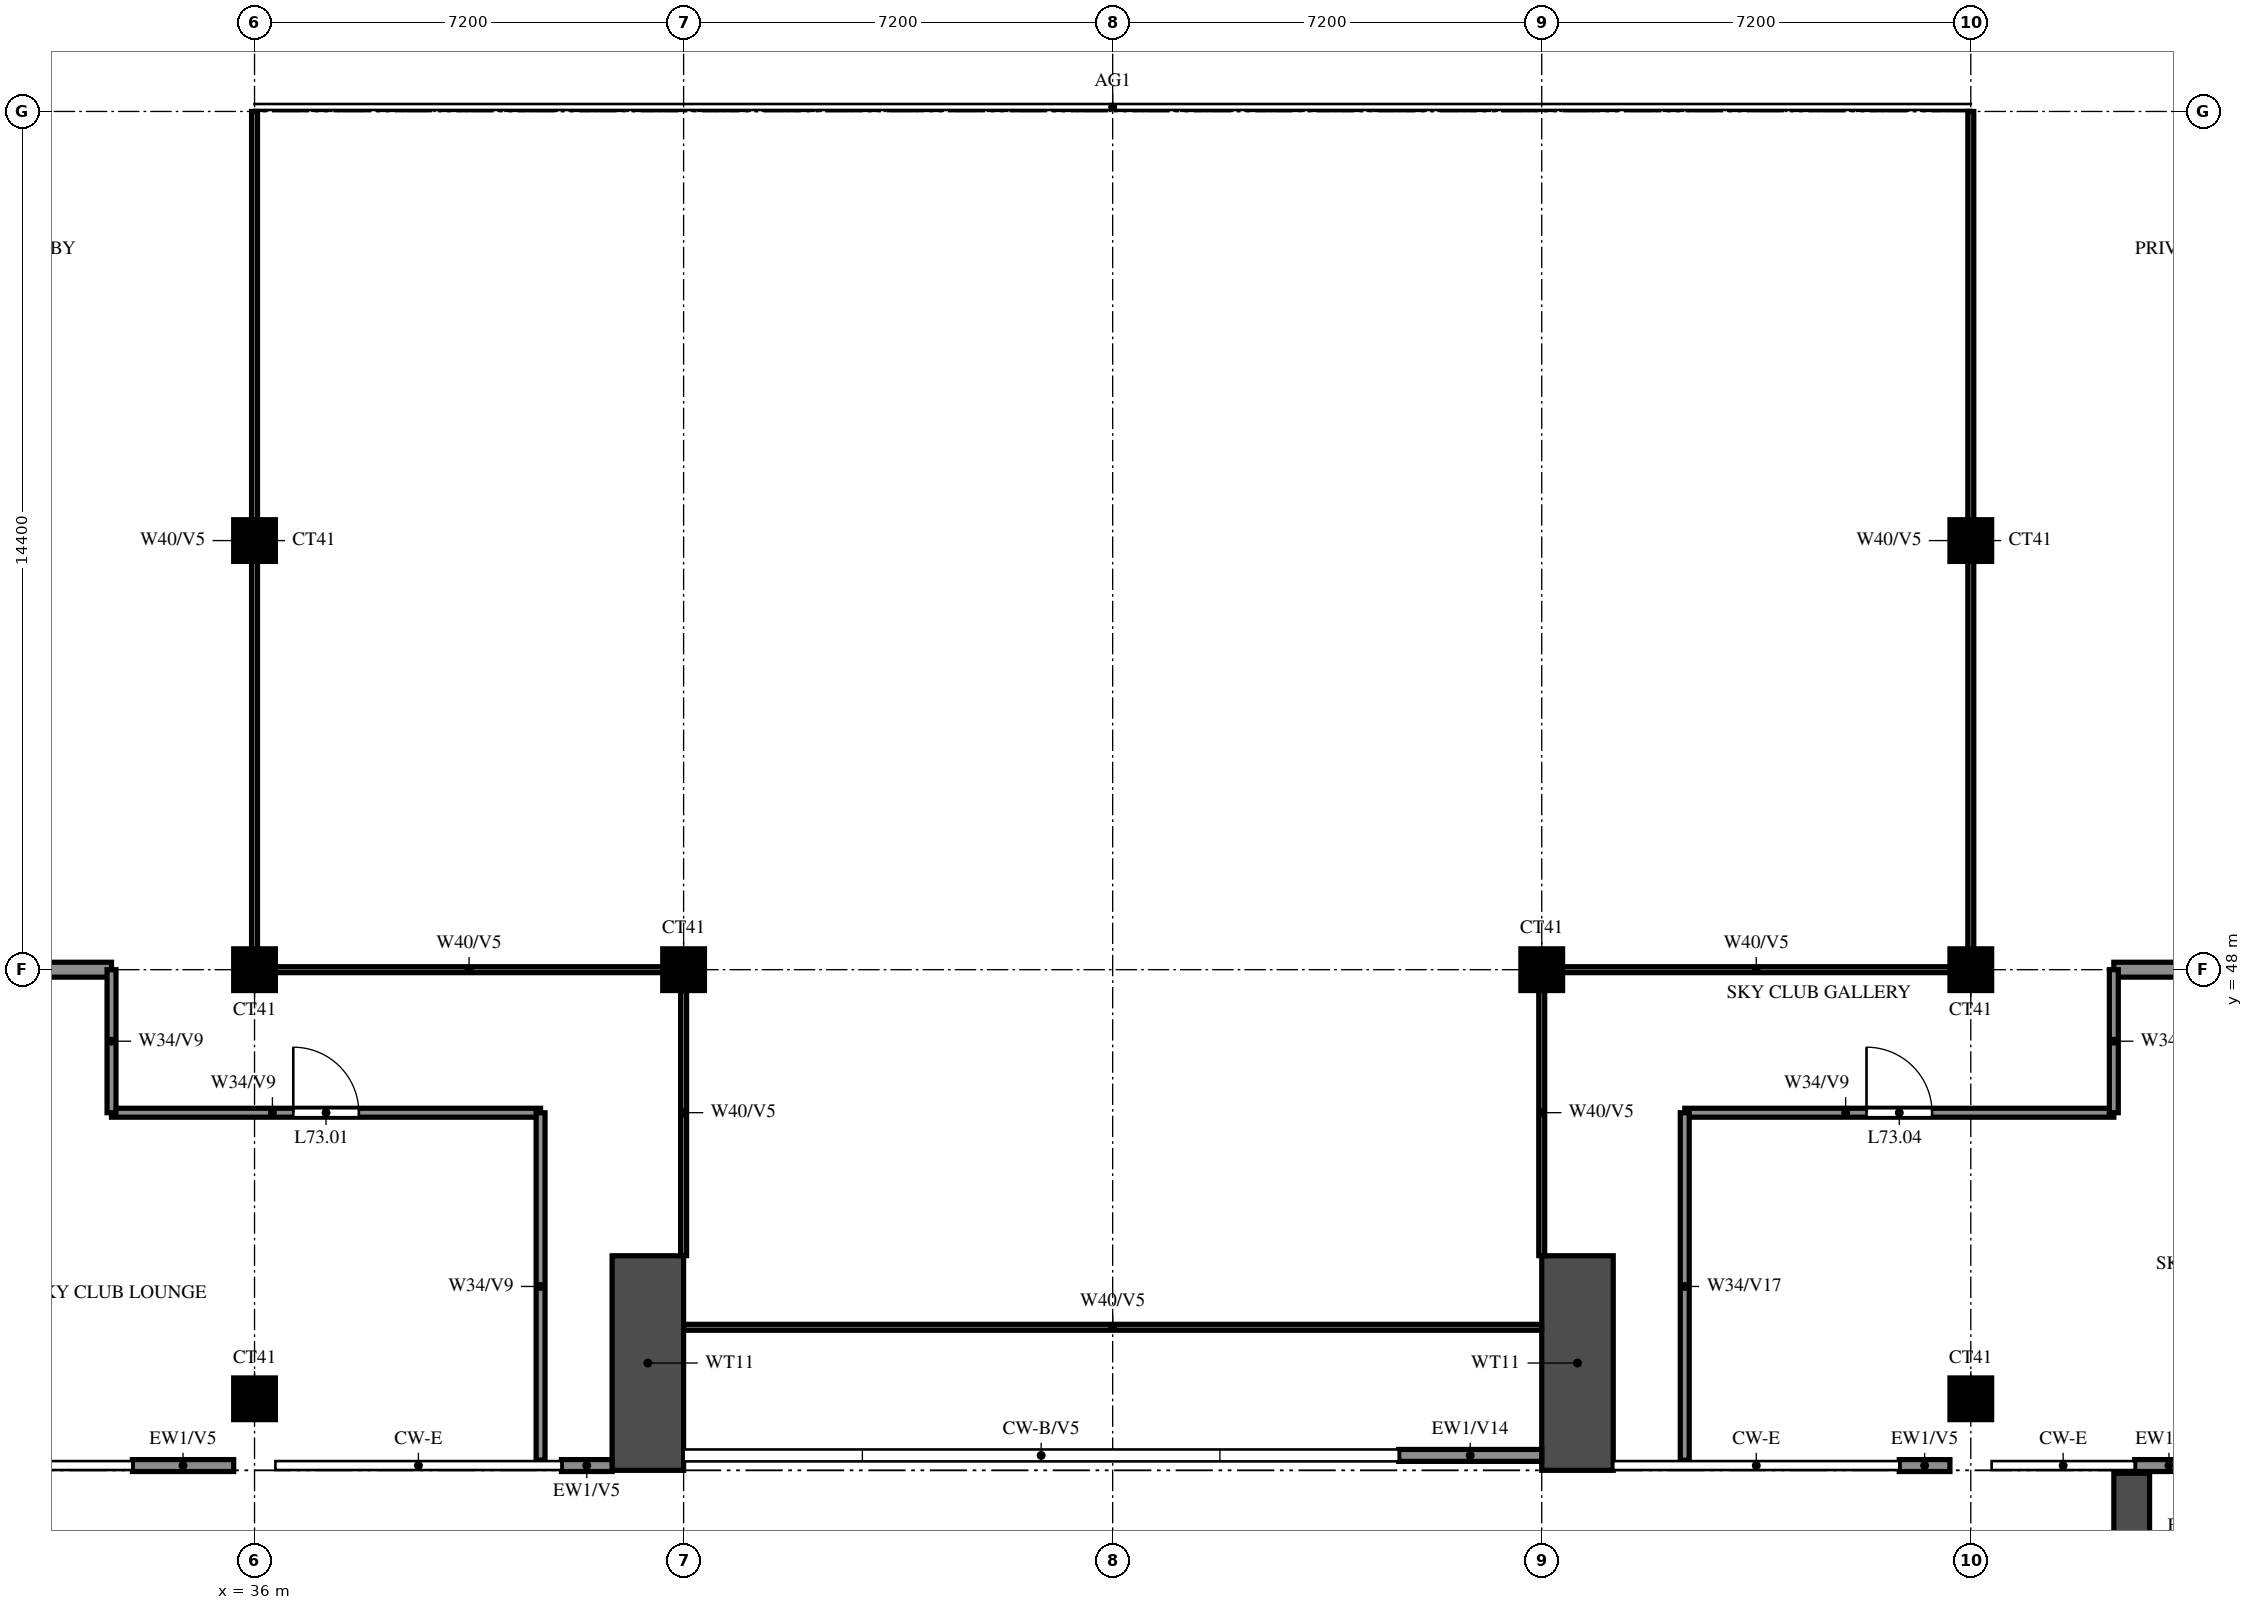
"""IFC4 building model, lengths in metres.
Left out: names, types, materials, properties, quantities, classifications, styles, units other than length and angle.
Written with IfcOpenShell. Run it as: python <this file> out.ifc"""

import sys

from ifc_helpers import new_model, si_unit, direction, frame, frame_2d, origin, origin_2d, place, context, subcontext, project, spatial, rectangle, extrude, source, transform, mapped, element, fill, save


model = new_model("IFC4")
c1 = context("Model", 3, precision=1e-05, world=origin(), true_north=direction((0.0, 1.0)))
c2 = subcontext(c1, "Body", "Model", "MODEL_VIEW")
j1 = project(units=[si_unit("LENGTHUNIT", "METRE"), si_unit("PLANEANGLEUNIT", "RADIAN")], contexts=[c1])
p1 = place(None, origin())
s1 = spatial("IfcSite", under=j1, at=p1, CompositionType="ELEMENT")
p2 = place(p1, origin())
s2 = spatial("IfcBuilding", under=s1, at=p2, CompositionType="ELEMENT")
p3 = place(p2, frame((0.0, 0.0, 271.0)))
s3 = spatial("IfcBuildingStorey", under=s2, at=p3, CompositionType="ELEMENT", Elevation=271.0)
m1 = source(origin(), c2, "Body", "SweptSolid", [
    extrude(rectangle(XDim=0.7, YDim=0.7, at=origin_2d()), origin(), (0.0, 0.0, 1.0), 3.15),
])
for number, where, z_axis, x_axis in (
    (1, (36.0, 40.8, 0.0), (0.0, 0.0, 1.0), (1.0, 0.0, 0.0)),
    (2, (64.8, 40.8, 0.0), (0.0, 0.0, 1.0), (1.0, 0.0, 0.0)),
    (3, (36.0, 48.0, 0.0), (0.0, 0.0, 1.0), (1.0, 0.0, 0.0)),
    (4, (43.2, 48.0, 0.0), (0.0, 0.0, 1.0), (1.0, 0.0, 0.0)),
    (5, (57.6, 48.0, 0.0), (0.0, 0.0, 1.0), (1.0, 0.0, 0.0)),
    (6, (64.8, 48.0, 0.0), (0.0, 0.0, 1.0), (1.0, 0.0, 0.0)),
    (7, (36.0, 55.2, 0.0), (0.0, 0.0, 1.0), (1.0, 0.0, 0.0)),
    (8, (64.8, 55.2, 0.0), (0.0, 0.0, 1.0), (1.0, 0.0, 0.0)),
):
    element("IfcColumn", number, at=place(p3, frame(where, z_axis=z_axis, x_axis=x_axis)), inside=s3, PredefinedType="COLUMN", context=c2, shape_type="MappedRepresentation", body=[
        mapped(m1, transform((0.0, 0.0, 0.0))),
    ])
for number, where, z_axis, x_axis in (
    (9, (42.6, 39.6, 0.0), (0.0, 0.0, 1.0), (0.0, 1.0, 0.0)),
    (10, (58.2, 39.6, 0.0), (0.0, 0.0, 1.0), (0.0, 1.0, 0.0)),
):
    element("IfcWall", number, at=place(p3, frame(where, z_axis=z_axis, x_axis=x_axis)), inside=s3, PredefinedType="SHEAR", context=c2, shape_type="SweptSolid", body=[
        extrude(rectangle(XDim=3.6, YDim=1.2, at=frame_2d((1.8, 0.0))), origin(), (0.0, 0.0, 1.0), 3.15),
    ])
p4 = place(p3, frame((33.95, 39.68, 0.0), z_axis=(0.0, 0.0, 1.0), x_axis=(1.0, 0.0, 0.0)))
e11 = element("IfcWall", 11, at=p4, inside=s3, PredefinedType="SOLIDWALL", context=c2, shape_type="SweptSolid", body=[
    extrude(rectangle(XDim=1.7, YDim=0.2, at=frame_2d((0.85, 0.0))), origin(), (0.0, 0.0, 1.0), 3.15),
])
p5 = place(p3, frame((41.15, 39.68, 0.0), z_axis=(0.0, 0.0, 1.0), x_axis=(1.0, 0.0, 0.0)))
e12 = element("IfcWall", 12, at=p5, inside=s3, PredefinedType="SOLIDWALL", context=c2, shape_type="SweptSolid", body=[
    extrude(rectangle(XDim=0.85, YDim=0.2, at=frame_2d((0.425, 0.0))), origin(), (0.0, 0.0, 1.0), 3.15),
])
p6 = place(p3, frame((63.6, 39.68, 0.0), z_axis=(0.0, 0.0, 1.0), x_axis=(1.0, 0.0, 0.0)))
e13 = element("IfcWall", 13, at=p6, inside=s3, PredefinedType="SOLIDWALL", context=c2, shape_type="SweptSolid", body=[
    extrude(rectangle(XDim=0.85, YDim=0.2, at=frame_2d((0.425, 0.0))), origin(), (0.0, 0.0, 1.0), 3.15),
])
p7 = place(p3, frame((67.55, 39.68, 0.0), z_axis=(0.0, 0.0, 1.0), x_axis=(1.0, 0.0, 0.0)))
e14 = element("IfcWall", 14, at=p7, inside=s3, PredefinedType="SOLIDWALL", context=c2, shape_type="SweptSolid", body=[
    extrude(rectangle(XDim=1.15, YDim=0.2, at=frame_2d((0.575, 0.0))), origin(), (0.0, 0.0, 1.0), 3.15),
])
p8 = place(p3, frame((55.2, 39.85, 0.0), z_axis=(0.0, 0.0, 1.0), x_axis=(1.0, 0.0, 0.0)))
e15 = element("IfcWall", 15, at=p8, inside=s3, PredefinedType="SOLIDWALL", context=c2, shape_type="SweptSolid", body=[
    extrude(rectangle(XDim=2.4, YDim=0.2, at=frame_2d((1.2, 0.0))), origin(), (0.0, 0.0, 1.0), 1.95),
])
p9 = place(p3, frame((67.5, 39.55, 0.0), z_axis=(0.0, 0.0, 1.0), x_axis=(0.0, -1.0, 0.0)))
e16 = element("IfcWall", 16, at=p9, inside=s3, PredefinedType="SOLIDWALL", context=c2, shape_type="SweptSolid", body=[
    extrude(rectangle(XDim=2.65, YDim=0.6, at=frame_2d((1.325, 0.0))), origin(), (0.0, 0.0, 1.0), 2.901),
])
p10 = place(p3, frame((43.202, 42.0, 0.0), z_axis=(0.0, 0.0, 1.0), x_axis=(1.0, 0.0, 0.0)))
e17 = element("IfcWall", 17, at=p10, inside=s3, PredefinedType="PARTITIONING", context=c2, shape_type="SweptSolid", body=[
    extrude(rectangle(XDim=14.396, YDim=0.1, at=frame_2d((7.198, 0.0))), origin(), (0.0, 0.0, 1.0), 2.25),
])
p11 = place(p3, frame((33.6, 45.6, 0.0), z_axis=(0.0, 0.0, 1.0), x_axis=(1.0, 0.0, 0.0)))
e18 = element("IfcWall", 18, at=p11, inside=s3, PredefinedType="PARTITIONING", context=c2, shape_type="SweptSolid", body=[
    extrude(rectangle(XDim=7.2, YDim=0.15, at=frame_2d((3.6, 0.0))), origin(), (0.0, 0.0, 1.0), 3.15),
])
p12 = place(p11, frame((3.05, 0.0, 0.0)))
e19 = element("IfcOpeningElement", 19, at=p12, cuts=e18, PredefinedType="OPENING", context=c2, shape_type="SweptSolid", body=[
    extrude(rectangle(XDim=1.1, YDim=2.1, at=frame_2d((0.55, 1.05))), frame((0.0, 0.085, 0.0), z_axis=(0.0, -1.0, 0.0), x_axis=(1.0, 0.0, 0.0)), (0.0, 0.0, 1.0), 0.17),
])
p13 = place(p3, frame((60.0, 45.6, 0.0), z_axis=(0.0, 0.0, 1.0), x_axis=(1.0, 0.0, 0.0)))
e20 = element("IfcWall", 20, at=p13, inside=s3, PredefinedType="PARTITIONING", context=c2, shape_type="SweptSolid", body=[
    extrude(rectangle(XDim=7.2, YDim=0.15, at=frame_2d((3.6, 0.0))), origin(), (0.0, 0.0, 1.0), 3.15),
])
p14 = place(p13, frame((3.05, 0.0, 0.0)))
e21 = element("IfcOpeningElement", 21, at=p14, cuts=e20, PredefinedType="OPENING", context=c2, shape_type="SweptSolid", body=[
    extrude(rectangle(XDim=1.1, YDim=2.1, at=frame_2d((0.55, 1.05))), frame((0.0, 0.085, 0.0), z_axis=(0.0, -1.0, 0.0), x_axis=(1.0, 0.0, 0.0)), (0.0, 0.0, 1.0), 0.17),
])
for number, where, z_axis, x_axis in (
    (22, (36.0, 48.0, 0.0), (0.0, 0.0, 1.0), (1.0, 0.0, 0.0)),
    (23, (57.6, 48.0, 0.0), (0.0, 0.0, 1.0), (1.0, 0.0, 0.0)),
):
    element("IfcWall", number, at=place(p3, frame(where, z_axis=z_axis, x_axis=x_axis)), inside=s3, PredefinedType="PARTITIONING", context=c2, shape_type="SweptSolid", body=[
        extrude(rectangle(XDim=7.2, YDim=0.1, at=frame_2d((3.6, 0.0))), origin(), (0.0, 0.0, 1.0), 2.25),
    ])
p15 = place(p3, frame((18.57, 48.0, 0.0), z_axis=(0.0, 0.0, 1.0), x_axis=(1.0, 0.0, 0.0)))
e24 = element("IfcWall", 24, at=p15, inside=s3, PredefinedType="SOLIDWALL", context=c2, shape_type="SweptSolid", body=[
    extrude(rectangle(XDim=15.03, YDim=0.25, at=frame_2d((7.515, 0.0))), origin(), (0.0, 0.0, 1.0), 3.15),
])
p16 = place(p3, frame((67.2, 48.0, 0.0), z_axis=(0.0, 0.0, 1.0), x_axis=(1.0, 0.0, 0.0)))
e25 = element("IfcWall", 25, at=p16, inside=s3, PredefinedType="SOLIDWALL", context=c2, shape_type="SweptSolid", body=[
    extrude(rectangle(XDim=4.63, YDim=0.25, at=frame_2d((2.315, 0.0))), origin(), (0.0, 0.0, 1.0), 3.15),
])
p17 = place(p3, frame((33.6, 45.6, 0.0), z_axis=(0.0, 0.0, 1.0), x_axis=(0.0, 1.0, 0.0)))
e26 = element("IfcWall", 26, at=p17, inside=s3, PredefinedType="PARTITIONING", context=c2, shape_type="SweptSolid", body=[
    extrude(rectangle(XDim=2.4, YDim=0.15, at=frame_2d((1.2, 0.0))), origin(), (0.0, 0.0, 1.0), 3.15),
])
p18 = place(p3, frame((36.0, 48.0, 0.0), z_axis=(0.0, 0.0, 1.0), x_axis=(0.0, 1.0, 0.0)))
e27 = element("IfcWall", 27, at=p18, inside=s3, PredefinedType="PARTITIONING", context=c2, shape_type="SweptSolid", body=[
    extrude(rectangle(XDim=14.4, YDim=0.1, at=frame_2d((7.2, 0.0))), origin(), (0.0, 0.0, 1.0), 2.25),
])
p19 = place(p3, frame((40.8, 39.77, 0.0), z_axis=(0.0, 0.0, 1.0), x_axis=(0.0, 1.0, 0.0)))
e28 = element("IfcWall", 28, at=p19, inside=s3, PredefinedType="PARTITIONING", context=c2, shape_type="SweptSolid", body=[
    extrude(rectangle(XDim=5.83, YDim=0.15, at=frame_2d((2.915, 0.0))), origin(), (0.0, 0.0, 1.0), 3.15),
])
for number, where, z_axis, x_axis in (
    (29, (43.2, 43.202, 0.0), (0.0, 0.0, 1.0), (0.0, 1.0, 0.0)),
    (30, (57.6, 43.202, 0.0), (0.0, 0.0, 1.0), (0.0, 1.0, 0.0)),
):
    element("IfcWall", number, at=place(p3, frame(where, z_axis=z_axis, x_axis=x_axis)), inside=s3, PredefinedType="PARTITIONING", context=c2, shape_type="SweptSolid", body=[
        extrude(rectangle(XDim=4.798, YDim=0.1, at=frame_2d((2.399, 0.0))), origin(), (0.0, 0.0, 1.0), 2.25),
    ])
p20 = place(p3, frame((60.0, 39.77, 0.0), z_axis=(0.0, 0.0, 1.0), x_axis=(0.0, 1.0, 0.0)))
e31 = element("IfcWall", 31, at=p20, inside=s3, PredefinedType="PARTITIONING", context=c2, shape_type="SweptSolid", body=[
    extrude(rectangle(XDim=5.83, YDim=0.15, at=frame_2d((2.915, 0.0))), origin(), (0.0, 0.0, 1.0), 2.2),
])
p21 = place(p3, frame((64.8, 48.0, 0.0), z_axis=(0.0, 0.0, 1.0), x_axis=(0.0, 1.0, 0.0)))
e32 = element("IfcWall", 32, at=p21, inside=s3, PredefinedType="PARTITIONING", context=c2, shape_type="SweptSolid", body=[
    extrude(rectangle(XDim=14.4, YDim=0.1, at=frame_2d((7.2, 0.0))), origin(), (0.0, 0.0, 1.0), 2.25),
])
p22 = place(p3, frame((67.2, 45.6, 0.0), z_axis=(0.0, 0.0, 1.0), x_axis=(0.0, 1.0, 0.0)))
e33 = element("IfcWall", 33, at=p22, inside=s3, PredefinedType="PARTITIONING", context=c2, shape_type="SweptSolid", body=[
    extrude(rectangle(XDim=2.4, YDim=0.15, at=frame_2d((1.2, 0.0))), origin(), (0.0, 0.0, 1.0), 3.15),
])
p23 = place(p12, origin())
e34 = element("IfcDoor", 34, at=p23, inside=s3, OperationType="SINGLE_SWING_RIGHT", PredefinedType="DOOR", context=c2, shape_type="SweptSolid", body=[
    extrude(rectangle(XDim=1.1, YDim=2.1, at=frame_2d((0.55, 1.05))), frame((0.0, 0.025, 0.0), z_axis=(0.0, -1.0, 0.0), x_axis=(1.0, 0.0, 0.0)), (0.0, 0.0, 1.0), 0.05),
])
fill(e19, e34)
p24 = place(p14, origin())
e35 = element("IfcDoor", 35, at=p24, inside=s3, OperationType="SINGLE_SWING_RIGHT", PredefinedType="DOOR", context=c2, shape_type="SweptSolid", body=[
    extrude(rectangle(XDim=1.1, YDim=2.1, at=frame_2d((0.55, 1.05))), frame((0.0, 0.025, 0.0), z_axis=(0.0, -1.0, 0.0), x_axis=(1.0, 0.0, 0.0)), (0.0, 0.0, 1.0), 0.05),
])
fill(e21, e35)
save(model, sys.argv[1])
